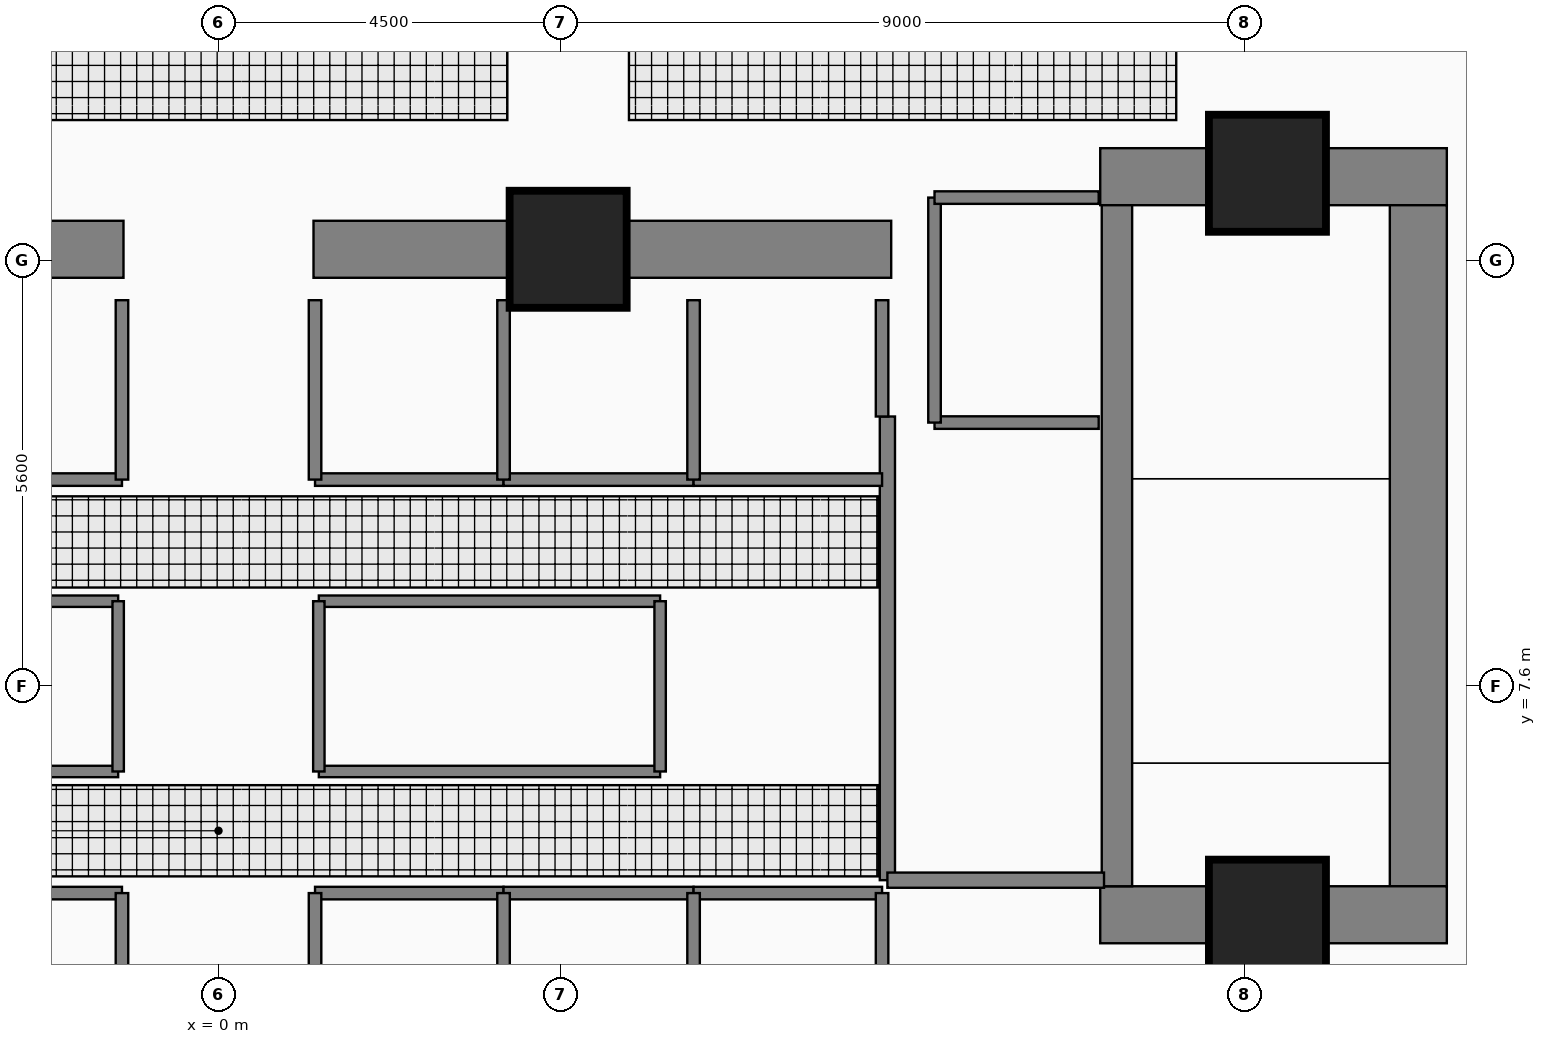
"""IFC4 building model, lengths in metres.
Left out: names, types, materials, properties, quantities, classifications, styles, units other than length and angle.
Written with IfcOpenShell. Run it as: python <this file> out.ifc"""

import sys

from ifc_helpers import new_model, si_unit, direction, frame, frame_2d, origin, origin_2d, place, context, subcontext, project, spatial, rectangle, extrude, element, fill, save


model = new_model("IFC4")
c1 = context("Model", 3, precision=1e-05, world=origin(), true_north=direction((0.0, 1.0)))
c2 = subcontext(c1, "Body", "Model", "MODEL_VIEW")
j1 = project(units=[si_unit("LENGTHUNIT", "METRE"), si_unit("PLANEANGLEUNIT", "RADIAN")], contexts=[c1])
p1 = place(None, origin())
s1 = spatial("IfcSite", under=j1, at=p1, CompositionType="ELEMENT")
p2 = place(p1, origin())
s2 = spatial("IfcBuilding", under=s1, at=p2, CompositionType="ELEMENT")
p3 = place(p2, frame((0.0, 0.0, 154.05)))
s3 = spatial("IfcBuildingStorey", under=s2, at=p3, CompositionType="ELEMENT", Elevation=154.05)
p4 = place(p3, frame((11.6, 14.305, 0.0), z_axis=(0.0, 0.0, 1.0), x_axis=(1.0, 0.0, 0.0)))
e1 = element("IfcWall", 1, at=p4, inside=s3, PredefinedType="SHEAR", context=c2, shape_type="SweptSolid", body=[
    extrude(rectangle(XDim=4.56, YDim=0.75, at=frame_2d((2.28, 0.0))), origin(), (0.0, 0.0, 1.0), 4.31),
])
p5 = place(p3, frame((15.785, 4.97, 0.0), z_axis=(0.0, 0.0, 1.0), x_axis=(0.0, 1.0, 0.0)))
e2 = element("IfcWall", 2, at=p5, inside=s3, PredefinedType="SHEAR", context=c2, shape_type="SweptSolid", body=[
    extrude(rectangle(XDim=8.96, YDim=0.75, at=frame_2d((4.48, 0.0))), origin(), (0.0, 0.0, 1.0), 4.31),
])
p6 = place(p3, frame((11.6, 4.595, 0.0), z_axis=(0.0, 0.0, 1.0), x_axis=(1.0, 0.0, 0.0)))
e3 = element("IfcWall", 3, at=p6, inside=s3, PredefinedType="SHEAR", context=c2, shape_type="SweptSolid", body=[
    extrude(rectangle(XDim=4.56, YDim=0.75, at=frame_2d((2.28, 0.0))), origin(), (0.0, 0.0, 1.0), 4.31),
])
for number, where, z_axis, x_axis in (
    (4, (-8.85, 13.35, 0.0), (0.0, 0.0, 1.0), (1.0, 0.0, 0.0)),
    (5, (1.25, 13.35, 0.0), (0.0, 0.0, 1.0), (1.0, 0.0, 0.0)),
):
    element("IfcWall", number, at=place(p3, frame(where, z_axis=z_axis, x_axis=x_axis)), inside=s3, PredefinedType="SHEAR", context=c2, shape_type="SweptSolid", body=[
        extrude(rectangle(XDim=7.6, YDim=0.75, at=frame_2d((3.8, 0.0))), origin(), (0.0, 0.0, 1.0), 4.28),
    ])
p7 = place(p3, frame((11.82, 13.93, 0.0), z_axis=(0.0, 0.0, 1.0), x_axis=(0.0, -1.0, 0.0)))
e6 = element("IfcWall", 6, at=p7, inside=s3, PredefinedType="SHEAR", context=c2, shape_type="SweptSolid", body=[
    extrude(rectangle(XDim=8.96, YDim=0.4, at=frame_2d((4.48, 0.0))), origin(), (0.0, 0.0, 1.0), 4.31),
])
p8 = place(p7, frame((7.53, 0.0, 0.0)))
e7 = element("IfcOpeningElement", 7, at=p8, cuts=e6, PredefinedType="OPENING", context=c2, shape_type="SweptSolid", body=[
    extrude(rectangle(XDim=1.12, YDim=2.22, at=frame_2d((0.56, 1.11))), frame((0.0, 0.21, 0.0), z_axis=(0.0, -1.0, 0.0), x_axis=(1.0, 0.0, 0.0)), (0.0, 0.0, 1.0), 0.42),
])
for number, where, z_axis, x_axis in (
    (8, (4.6, 13.35, 0.0), (0.0, 0.0, 1.0), (1.0, 0.0, 0.0)),
    (9, (13.8, 14.35, 0.0), (0.0, 0.0, 1.0), (1.0, 0.0, 0.0)),
    (10, (13.8, 4.55, 0.0), (0.0, 0.0, 1.0), (1.0, 0.0, 0.0)),
):
    element("IfcColumn", number, at=place(p3, frame(where, z_axis=z_axis, x_axis=x_axis)), inside=s3, PredefinedType="COLUMN", context=c2, shape_type="SweptSolid", body=[
        extrude(rectangle(XDim=1.5, YDim=1.5, at=origin_2d()), origin(), (0.0, 0.0, 1.0), 4.5),
    ])
p9 = place(p3, frame((8.8, 11.15, 0.0), z_axis=(0.0, 0.0, 1.0), x_axis=(0.0, -1.0, 0.0)))
e11 = element("IfcWall", 11, at=p9, inside=s3, PredefinedType="PARTITIONING", context=c2, shape_type="SweptSolid", body=[
    extrude(rectangle(XDim=6.1, YDim=0.2, at=frame_2d((3.05, 0.0))), origin(), (0.0, 0.0, 1.0), 4.28),
])
p10 = place(p9, frame((1.15, 0.0, 0.0)))
e12 = element("IfcOpeningElement", 12, at=p10, cuts=e11, PredefinedType="OPENING", context=c2, shape_type="SweptSolid", body=[
    extrude(rectangle(XDim=1.1, YDim=2.2, at=frame_2d((0.55, 1.1))), frame((0.0, 0.11, 0.0), z_axis=(0.0, -1.0, 0.0), x_axis=(1.0, 0.0, 0.0)), (0.0, 0.0, 1.0), 0.22),
])
p11 = place(p9, frame((4.75, 0.0, 0.0)))
e13 = element("IfcOpeningElement", 13, at=p11, cuts=e11, PredefinedType="OPENING", context=c2, shape_type="SweptSolid", body=[
    extrude(rectangle(XDim=1.1, YDim=2.2, at=frame_2d((0.55, 1.1))), frame((0.0, 0.11, 0.0), z_axis=(0.0, -1.0, 0.0), x_axis=(1.0, 0.0, 0.0)), (0.0, 0.0, 1.0), 0.22),
])
p12 = place(p3, frame((9.42, 11.07, 0.0), z_axis=(0.0, 0.0, 1.0), x_axis=(1.0, 0.0, 0.0)))
e14 = element("IfcWall", 14, at=p12, inside=s3, PredefinedType="PARTITIONING", context=c2, shape_type="SweptSolid", body=[
    extrude(rectangle(XDim=2.16, YDim=0.165, at=frame_2d((1.08, 0.0))), origin(), (0.0, 0.0, 1.0), 4.28),
])
p13 = place(p12, frame((0.53, 0.0, 0.0)))
e15 = element("IfcOpeningElement", 15, at=p13, cuts=e14, PredefinedType="OPENING", context=c2, shape_type="SweptSolid", body=[
    extrude(rectangle(XDim=1.15, YDim=2.25, at=frame_2d((0.575, 1.125))), frame((0.0, 0.093, 0.0), z_axis=(0.0, -1.0, 0.0), x_axis=(1.0, 0.0, 0.0)), (0.0, 0.0, 1.0), 0.185),
])
p14 = place(p3, frame((-3.75, 4.88, 0.0), z_axis=(0.0, 0.0, 1.0), x_axis=(1.0, 0.0, 0.0)))
e16 = element("IfcWall", 16, at=p14, inside=s3, PredefinedType="PARTITIONING", context=c2, shape_type="SweptSolid", body=[
    extrude(rectangle(XDim=2.48, YDim=0.165, at=frame_2d((1.24, 0.0))), origin(), (0.0, 0.0, 1.0), 4.28),
])
p15 = place(p14, frame((0.69, 0.0, 0.0)))
e17 = element("IfcOpeningElement", 17, at=p15, cuts=e16, PredefinedType="OPENING", context=c2, shape_type="SweptSolid", body=[
    extrude(rectangle(XDim=1.1, YDim=2.25, at=frame_2d((0.55, 1.125))), frame((0.0, 0.093, 0.0), z_axis=(0.0, -1.0, 0.0), x_axis=(1.0, 0.0, 0.0)), (0.0, 0.0, 1.0), 0.185),
])
p16 = place(p3, frame((1.27, 4.88, 0.0), z_axis=(0.0, 0.0, 1.0), x_axis=(1.0, 0.0, 0.0)))
e18 = element("IfcWall", 18, at=p16, inside=s3, PredefinedType="PARTITIONING", context=c2, shape_type="SweptSolid", body=[
    extrude(rectangle(XDim=2.48, YDim=0.165, at=frame_2d((1.24, 0.0))), origin(), (0.0, 0.0, 1.0), 4.28),
])
p17 = place(p16, frame((0.69, 0.0, 0.0)))
e19 = element("IfcOpeningElement", 19, at=p17, cuts=e18, PredefinedType="OPENING", context=c2, shape_type="SweptSolid", body=[
    extrude(rectangle(XDim=1.1, YDim=2.25, at=frame_2d((0.55, 1.125))), frame((0.0, 0.093, 0.0), z_axis=(0.0, -1.0, 0.0), x_axis=(1.0, 0.0, 0.0)), (0.0, 0.0, 1.0), 0.185),
])
p18 = place(p3, frame((-3.75, 10.32, 0.0), z_axis=(0.0, 0.0, 1.0), x_axis=(1.0, 0.0, 0.0)))
e20 = element("IfcWall", 20, at=p18, inside=s3, PredefinedType="PARTITIONING", context=c2, shape_type="SweptSolid", body=[
    extrude(rectangle(XDim=2.48, YDim=0.165, at=frame_2d((1.24, 0.0))), origin(), (0.0, 0.0, 1.0), 4.28),
])
p19 = place(p18, frame((0.69, 0.0, 0.0)))
e21 = element("IfcOpeningElement", 21, at=p19, cuts=e20, PredefinedType="OPENING", context=c2, shape_type="SweptSolid", body=[
    extrude(rectangle(XDim=1.1, YDim=2.25, at=frame_2d((0.55, 1.125))), frame((0.0, 0.093, 0.0), z_axis=(0.0, -1.0, 0.0), x_axis=(1.0, 0.0, 0.0)), (0.0, 0.0, 1.0), 0.185),
])
p20 = place(p3, frame((1.27, 10.32, 0.0), z_axis=(0.0, 0.0, 1.0), x_axis=(1.0, 0.0, 0.0)))
e22 = element("IfcWall", 22, at=p20, inside=s3, PredefinedType="PARTITIONING", context=c2, shape_type="SweptSolid", body=[
    extrude(rectangle(XDim=2.48, YDim=0.165, at=frame_2d((1.24, 0.0))), origin(), (0.0, 0.0, 1.0), 4.28),
])
p21 = place(p20, frame((0.69, 0.0, 0.0)))
e23 = element("IfcOpeningElement", 23, at=p21, cuts=e22, PredefinedType="OPENING", context=c2, shape_type="SweptSolid", body=[
    extrude(rectangle(XDim=1.1, YDim=2.25, at=frame_2d((0.55, 1.125))), frame((0.0, 0.093, 0.0), z_axis=(0.0, -1.0, 0.0), x_axis=(1.0, 0.0, 0.0)), (0.0, 0.0, 1.0), 0.185),
])
p22 = place(p3, frame((3.75, 4.88, 0.0), z_axis=(0.0, 0.0, 1.0), x_axis=(1.0, 0.0, 0.0)))
e24 = element("IfcWall", 24, at=p22, inside=s3, PredefinedType="PARTITIONING", context=c2, shape_type="SweptSolid", body=[
    extrude(rectangle(XDim=2.5, YDim=0.165, at=frame_2d((1.25, 0.0))), origin(), (0.0, 0.0, 1.0), 4.28),
])
p23 = place(p22, frame((0.7, 0.0, 0.0)))
e25 = element("IfcOpeningElement", 25, at=p23, cuts=e24, PredefinedType="OPENING", context=c2, shape_type="SweptSolid", body=[
    extrude(rectangle(XDim=1.1, YDim=2.25, at=frame_2d((0.55, 1.125))), frame((0.0, 0.093, 0.0), z_axis=(0.0, -1.0, 0.0), x_axis=(1.0, 0.0, 0.0)), (0.0, 0.0, 1.0), 0.185),
])
p24 = place(p3, frame((6.25, 4.88, 0.0), z_axis=(0.0, 0.0, 1.0), x_axis=(1.0, 0.0, 0.0)))
e26 = element("IfcWall", 26, at=p24, inside=s3, PredefinedType="PARTITIONING", context=c2, shape_type="SweptSolid", body=[
    extrude(rectangle(XDim=2.48, YDim=0.165, at=frame_2d((1.24, 0.0))), origin(), (0.0, 0.0, 1.0), 4.28),
])
p25 = place(p24, frame((0.69, 0.0, 0.0)))
e27 = element("IfcOpeningElement", 27, at=p25, cuts=e26, PredefinedType="OPENING", context=c2, shape_type="SweptSolid", body=[
    extrude(rectangle(XDim=1.1, YDim=2.25, at=frame_2d((0.55, 1.125))), frame((0.0, 0.093, 0.0), z_axis=(0.0, -1.0, 0.0), x_axis=(1.0, 0.0, 0.0)), (0.0, 0.0, 1.0), 0.185),
])
p26 = place(p3, frame((3.75, 10.32, 0.0), z_axis=(0.0, 0.0, 1.0), x_axis=(1.0, 0.0, 0.0)))
e28 = element("IfcWall", 28, at=p26, inside=s3, PredefinedType="PARTITIONING", context=c2, shape_type="SweptSolid", body=[
    extrude(rectangle(XDim=2.5, YDim=0.165, at=frame_2d((1.25, 0.0))), origin(), (0.0, 0.0, 1.0), 4.28),
])
p27 = place(p26, frame((0.7, 0.0, 0.0)))
e29 = element("IfcOpeningElement", 29, at=p27, cuts=e28, PredefinedType="OPENING", context=c2, shape_type="SweptSolid", body=[
    extrude(rectangle(XDim=1.1, YDim=2.25, at=frame_2d((0.55, 1.125))), frame((0.0, 0.093, 0.0), z_axis=(0.0, -1.0, 0.0), x_axis=(1.0, 0.0, 0.0)), (0.0, 0.0, 1.0), 0.185),
])
p28 = place(p3, frame((6.25, 10.32, 0.0), z_axis=(0.0, 0.0, 1.0), x_axis=(1.0, 0.0, 0.0)))
e30 = element("IfcWall", 30, at=p28, inside=s3, PredefinedType="PARTITIONING", context=c2, shape_type="SweptSolid", body=[
    extrude(rectangle(XDim=2.48, YDim=0.165, at=frame_2d((1.24, 0.0))), origin(), (0.0, 0.0, 1.0), 4.28),
])
p29 = place(p28, frame((0.69, 0.0, 0.0)))
e31 = element("IfcOpeningElement", 31, at=p29, cuts=e30, PredefinedType="OPENING", context=c2, shape_type="SweptSolid", body=[
    extrude(rectangle(XDim=1.1, YDim=2.25, at=frame_2d((0.55, 1.125))), frame((0.0, 0.093, 0.0), z_axis=(0.0, -1.0, 0.0), x_axis=(1.0, 0.0, 0.0)), (0.0, 0.0, 1.0), 0.185),
])
p30 = place(p3, frame((-4.93, 8.72, 0.0), z_axis=(0.0, 0.0, 1.0), x_axis=(1.0, 0.0, 0.0)))
e32 = element("IfcWall", 32, at=p30, inside=s3, PredefinedType="PARTITIONING", context=c2, shape_type="SweptSolid", body=[
    extrude(rectangle(XDim=3.61, YDim=0.15, at=frame_2d((1.805, 0.0))), origin(), (0.0, 0.0, 1.0), 4.28),
])
p31 = place(p30, frame((1.355, 0.0, 0.0)))
e33 = element("IfcOpeningElement", 33, at=p31, cuts=e32, PredefinedType="OPENING", context=c2, shape_type="SweptSolid", body=[
    extrude(rectangle(XDim=0.9, YDim=2.15, at=frame_2d((0.45, 1.075))), frame((0.0, 0.085, 0.0), z_axis=(0.0, -1.0, 0.0), x_axis=(1.0, 0.0, 0.0)), (0.0, 0.0, 1.0), 0.17),
])
p32 = place(p3, frame((1.32, 6.48, 0.0), z_axis=(0.0, 0.0, 1.0), x_axis=(1.0, 0.0, 0.0)))
e34 = element("IfcWall", 34, at=p32, inside=s3, PredefinedType="PARTITIONING", context=c2, shape_type="SweptSolid", body=[
    extrude(rectangle(XDim=4.49, YDim=0.15, at=frame_2d((2.245, 0.0))), origin(), (0.0, 0.0, 1.0), 4.28),
])
p33 = place(p32, frame((1.795, 0.0, 0.0)))
e35 = element("IfcOpeningElement", 35, at=p33, cuts=e34, PredefinedType="OPENING", context=c2, shape_type="SweptSolid", body=[
    extrude(rectangle(XDim=0.9, YDim=2.15, at=frame_2d((0.45, 1.075))), frame((0.0, 0.085, 0.0), z_axis=(0.0, -1.0, 0.0), x_axis=(1.0, 0.0, 0.0)), (0.0, 0.0, 1.0), 0.17),
])
p34 = place(p3, frame((8.8, 5.05, 0.0), z_axis=(0.0, 0.0, 1.0), x_axis=(1.0, 0.0, 0.0)))
e36 = element("IfcWall", 36, at=p34, inside=s3, PredefinedType="PARTITIONING", context=c2, shape_type="SweptSolid", body=[
    extrude(rectangle(XDim=2.85, YDim=0.2, at=frame_2d((1.425, 0.0))), origin(), (0.0, 0.0, 1.0), 4.28),
])
p35 = place(p3, frame((9.42, 11.07, 0.0), z_axis=(0.0, 0.0, 1.0), x_axis=(0.0, 1.0, 0.0)))
e37 = element("IfcWall", 37, at=p35, inside=s3, PredefinedType="PARTITIONING", context=c2, shape_type="SweptSolid", body=[
    extrude(rectangle(XDim=2.96, YDim=0.165, at=frame_2d((1.48, 0.0))), origin(), (0.0, 0.0, 1.0), 4.28),
])
p36 = place(p3, frame((9.42, 14.03, 0.0), z_axis=(0.0, 0.0, 1.0), x_axis=(1.0, 0.0, 0.0)))
e38 = element("IfcWall", 38, at=p36, inside=s3, PredefinedType="PARTITIONING", context=c2, shape_type="SweptSolid", body=[
    extrude(rectangle(XDim=2.16, YDim=0.165, at=frame_2d((1.08, 0.0))), origin(), (0.0, 0.0, 1.0), 4.28),
])
for number, where, z_axis, x_axis in (
    (39, (-1.27, 2.52, 0.0), (0.0, 0.0, 1.0), (0.0, 1.0, 0.0)),
    (40, (1.27, 2.52, 0.0), (0.0, 0.0, 1.0), (0.0, 1.0, 0.0)),
    (41, (3.75, 2.52, 0.0), (0.0, 0.0, 1.0), (0.0, 1.0, 0.0)),
    (42, (-1.27, 10.32, 0.0), (0.0, 0.0, 1.0), (0.0, 1.0, 0.0)),
    (43, (1.27, 10.32, 0.0), (0.0, 0.0, 1.0), (0.0, 1.0, 0.0)),
    (44, (3.75, 10.32, 0.0), (0.0, 0.0, 1.0), (0.0, 1.0, 0.0)),
    (45, (6.25, 2.52, 0.0), (0.0, 0.0, 1.0), (0.0, 1.0, 0.0)),
    (46, (8.73, 2.52, 0.0), (0.0, 0.0, 1.0), (0.0, 1.0, 0.0)),
    (47, (6.25, 10.32, 0.0), (0.0, 0.0, 1.0), (0.0, 1.0, 0.0)),
):
    element("IfcWall", number, at=place(p3, frame(where, z_axis=z_axis, x_axis=x_axis)), inside=s3, PredefinedType="PARTITIONING", context=c2, shape_type="SweptSolid", body=[
        extrude(rectangle(XDim=2.36, YDim=0.165, at=frame_2d((1.18, 0.0))), origin(), (0.0, 0.0, 1.0), 4.28),
    ])
p37 = place(p3, frame((8.73, 11.15, 0.0), z_axis=(0.0, 0.0, 1.0), x_axis=(0.0, 1.0, 0.0)))
e48 = element("IfcWall", 48, at=p37, inside=s3, PredefinedType="PARTITIONING", context=c2, shape_type="SweptSolid", body=[
    extrude(rectangle(XDim=1.53, YDim=0.165, at=frame_2d((0.765, 0.0))), origin(), (0.0, 0.0, 1.0), 4.28),
])
p38 = place(p3, frame((-4.93, 6.48, 0.0), z_axis=(0.0, 0.0, 1.0), x_axis=(1.0, 0.0, 0.0)))
e49 = element("IfcWall", 49, at=p38, inside=s3, PredefinedType="PARTITIONING", context=c2, shape_type="SweptSolid", body=[
    extrude(rectangle(XDim=3.61, YDim=0.15, at=frame_2d((1.805, 0.0))), origin(), (0.0, 0.0, 1.0), 4.28),
])
p39 = place(p3, frame((-1.32, 6.48, 0.0), z_axis=(0.0, 0.0, 1.0), x_axis=(0.0, 1.0, 0.0)))
e50 = element("IfcWall", 50, at=p39, inside=s3, PredefinedType="PARTITIONING", context=c2, shape_type="SweptSolid", body=[
    extrude(rectangle(XDim=2.24, YDim=0.15, at=frame_2d((1.12, 0.0))), origin(), (0.0, 0.0, 1.0), 4.28),
])
p40 = place(p3, frame((1.32, 8.72, 0.0), z_axis=(0.0, 0.0, 1.0), x_axis=(1.0, 0.0, 0.0)))
e51 = element("IfcWall", 51, at=p40, inside=s3, PredefinedType="PARTITIONING", context=c2, shape_type="SweptSolid", body=[
    extrude(rectangle(XDim=4.49, YDim=0.15, at=frame_2d((2.245, 0.0))), origin(), (0.0, 0.0, 1.0), 4.28),
])
for number, where, z_axis, x_axis in (
    (52, (1.32, 6.48, 0.0), (0.0, 0.0, 1.0), (0.0, 1.0, 0.0)),
    (53, (5.81, 6.48, 0.0), (0.0, 0.0, 1.0), (0.0, 1.0, 0.0)),
):
    element("IfcWall", number, at=place(p3, frame(where, z_axis=z_axis, x_axis=x_axis)), inside=s3, PredefinedType="PARTITIONING", context=c2, shape_type="SweptSolid", body=[
        extrude(rectangle(XDim=2.24, YDim=0.15, at=frame_2d((1.12, 0.0))), origin(), (0.0, 0.0, 1.0), 4.28),
    ])
p41 = place(p8, origin())
e54 = element("IfcDoor", 54, at=p41, inside=s3, OperationType="SINGLE_SWING_RIGHT", PredefinedType="DOOR", context=c2, shape_type="SweptSolid", body=[
    extrude(rectangle(XDim=1.12, YDim=2.22, at=frame_2d((0.56, 1.11))), frame((0.0, 0.025, 0.0), z_axis=(0.0, -1.0, 0.0), x_axis=(1.0, 0.0, 0.0)), (0.0, 0.0, 1.0), 0.05),
])
fill(e7, e54)
p42 = place(p10, origin())
e55 = element("IfcDoor", 55, at=p42, inside=s3, OperationType="SINGLE_SWING_RIGHT", PredefinedType="DOOR", context=c2, shape_type="SweptSolid", body=[
    extrude(rectangle(XDim=1.1, YDim=2.2, at=frame_2d((0.55, 1.1))), frame((0.0, 0.025, 0.0), z_axis=(0.0, -1.0, 0.0), x_axis=(1.0, 0.0, 0.0)), (0.0, 0.0, 1.0), 0.05),
])
fill(e12, e55)
p43 = place(p11, origin())
e56 = element("IfcDoor", 56, at=p43, inside=s3, OperationType="SINGLE_SWING_LEFT", PredefinedType="DOOR", context=c2, shape_type="SweptSolid", body=[
    extrude(rectangle(XDim=1.1, YDim=2.2, at=frame_2d((0.55, 1.1))), frame((0.0, 0.025, 0.0), z_axis=(0.0, -1.0, 0.0), x_axis=(1.0, 0.0, 0.0)), (0.0, 0.0, 1.0), 0.05),
])
fill(e13, e56)
p44 = place(p13, origin())
e57 = element("IfcDoor", 57, at=p44, inside=s3, OperationType="SLIDING_TO_LEFT", PredefinedType="DOOR", context=c2, shape_type="SweptSolid", body=[
    extrude(rectangle(XDim=1.15, YDim=2.25, at=frame_2d((0.575, 1.125))), frame((0.0, 0.025, 0.0), z_axis=(0.0, -1.0, 0.0), x_axis=(1.0, 0.0, 0.0)), (0.0, 0.0, 1.0), 0.05),
])
fill(e15, e57)
p45 = place(p15, origin())
e58 = element("IfcDoor", 58, at=p45, inside=s3, OperationType="SLIDING_TO_LEFT", PredefinedType="DOOR", context=c2, shape_type="SweptSolid", body=[
    extrude(rectangle(XDim=1.1, YDim=2.25, at=frame_2d((0.55, 1.125))), frame((0.0, 0.025, 0.0), z_axis=(0.0, -1.0, 0.0), x_axis=(1.0, 0.0, 0.0)), (0.0, 0.0, 1.0), 0.05),
])
fill(e17, e58)
p46 = place(p17, origin())
e59 = element("IfcDoor", 59, at=p46, inside=s3, OperationType="SLIDING_TO_LEFT", PredefinedType="DOOR", context=c2, shape_type="SweptSolid", body=[
    extrude(rectangle(XDim=1.1, YDim=2.25, at=frame_2d((0.55, 1.125))), frame((0.0, 0.025, 0.0), z_axis=(0.0, -1.0, 0.0), x_axis=(1.0, 0.0, 0.0)), (0.0, 0.0, 1.0), 0.05),
])
fill(e19, e59)
p47 = place(p19, origin())
e60 = element("IfcDoor", 60, at=p47, inside=s3, OperationType="SLIDING_TO_LEFT", PredefinedType="DOOR", context=c2, shape_type="SweptSolid", body=[
    extrude(rectangle(XDim=1.1, YDim=2.25, at=frame_2d((0.55, 1.125))), frame((0.0, 0.025, 0.0), z_axis=(0.0, -1.0, 0.0), x_axis=(1.0, 0.0, 0.0)), (0.0, 0.0, 1.0), 0.05),
])
fill(e21, e60)
p48 = place(p21, origin())
e61 = element("IfcDoor", 61, at=p48, inside=s3, OperationType="SLIDING_TO_LEFT", PredefinedType="DOOR", context=c2, shape_type="SweptSolid", body=[
    extrude(rectangle(XDim=1.1, YDim=2.25, at=frame_2d((0.55, 1.125))), frame((0.0, 0.025, 0.0), z_axis=(0.0, -1.0, 0.0), x_axis=(1.0, 0.0, 0.0)), (0.0, 0.0, 1.0), 0.05),
])
fill(e23, e61)
p49 = place(p23, origin())
e62 = element("IfcDoor", 62, at=p49, inside=s3, OperationType="SLIDING_TO_LEFT", PredefinedType="DOOR", context=c2, shape_type="SweptSolid", body=[
    extrude(rectangle(XDim=1.1, YDim=2.25, at=frame_2d((0.55, 1.125))), frame((0.0, 0.025, 0.0), z_axis=(0.0, -1.0, 0.0), x_axis=(1.0, 0.0, 0.0)), (0.0, 0.0, 1.0), 0.05),
])
fill(e25, e62)
p50 = place(p25, origin())
e63 = element("IfcDoor", 63, at=p50, inside=s3, OperationType="SLIDING_TO_LEFT", PredefinedType="DOOR", context=c2, shape_type="SweptSolid", body=[
    extrude(rectangle(XDim=1.1, YDim=2.25, at=frame_2d((0.55, 1.125))), frame((0.0, 0.025, 0.0), z_axis=(0.0, -1.0, 0.0), x_axis=(1.0, 0.0, 0.0)), (0.0, 0.0, 1.0), 0.05),
])
fill(e27, e63)
p51 = place(p27, origin())
e64 = element("IfcDoor", 64, at=p51, inside=s3, OperationType="SLIDING_TO_LEFT", PredefinedType="DOOR", context=c2, shape_type="SweptSolid", body=[
    extrude(rectangle(XDim=1.1, YDim=2.25, at=frame_2d((0.55, 1.125))), frame((0.0, 0.025, 0.0), z_axis=(0.0, -1.0, 0.0), x_axis=(1.0, 0.0, 0.0)), (0.0, 0.0, 1.0), 0.05),
])
fill(e29, e64)
p52 = place(p29, origin())
e65 = element("IfcDoor", 65, at=p52, inside=s3, OperationType="SLIDING_TO_LEFT", PredefinedType="DOOR", context=c2, shape_type="SweptSolid", body=[
    extrude(rectangle(XDim=1.1, YDim=2.25, at=frame_2d((0.55, 1.125))), frame((0.0, 0.025, 0.0), z_axis=(0.0, -1.0, 0.0), x_axis=(1.0, 0.0, 0.0)), (0.0, 0.0, 1.0), 0.05),
])
fill(e31, e65)
p53 = place(p33, origin())
e66 = element("IfcDoor", 66, at=p53, inside=s3, OperationType="SINGLE_SWING_RIGHT", PredefinedType="DOOR", context=c2, shape_type="SweptSolid", body=[
    extrude(rectangle(XDim=0.9, YDim=2.15, at=frame_2d((0.45, 1.075))), frame((0.0, 0.025, 0.0), z_axis=(0.0, -1.0, 0.0), x_axis=(1.0, 0.0, 0.0)), (0.0, 0.0, 1.0), 0.05),
])
fill(e35, e66)
save(model, sys.argv[1])
